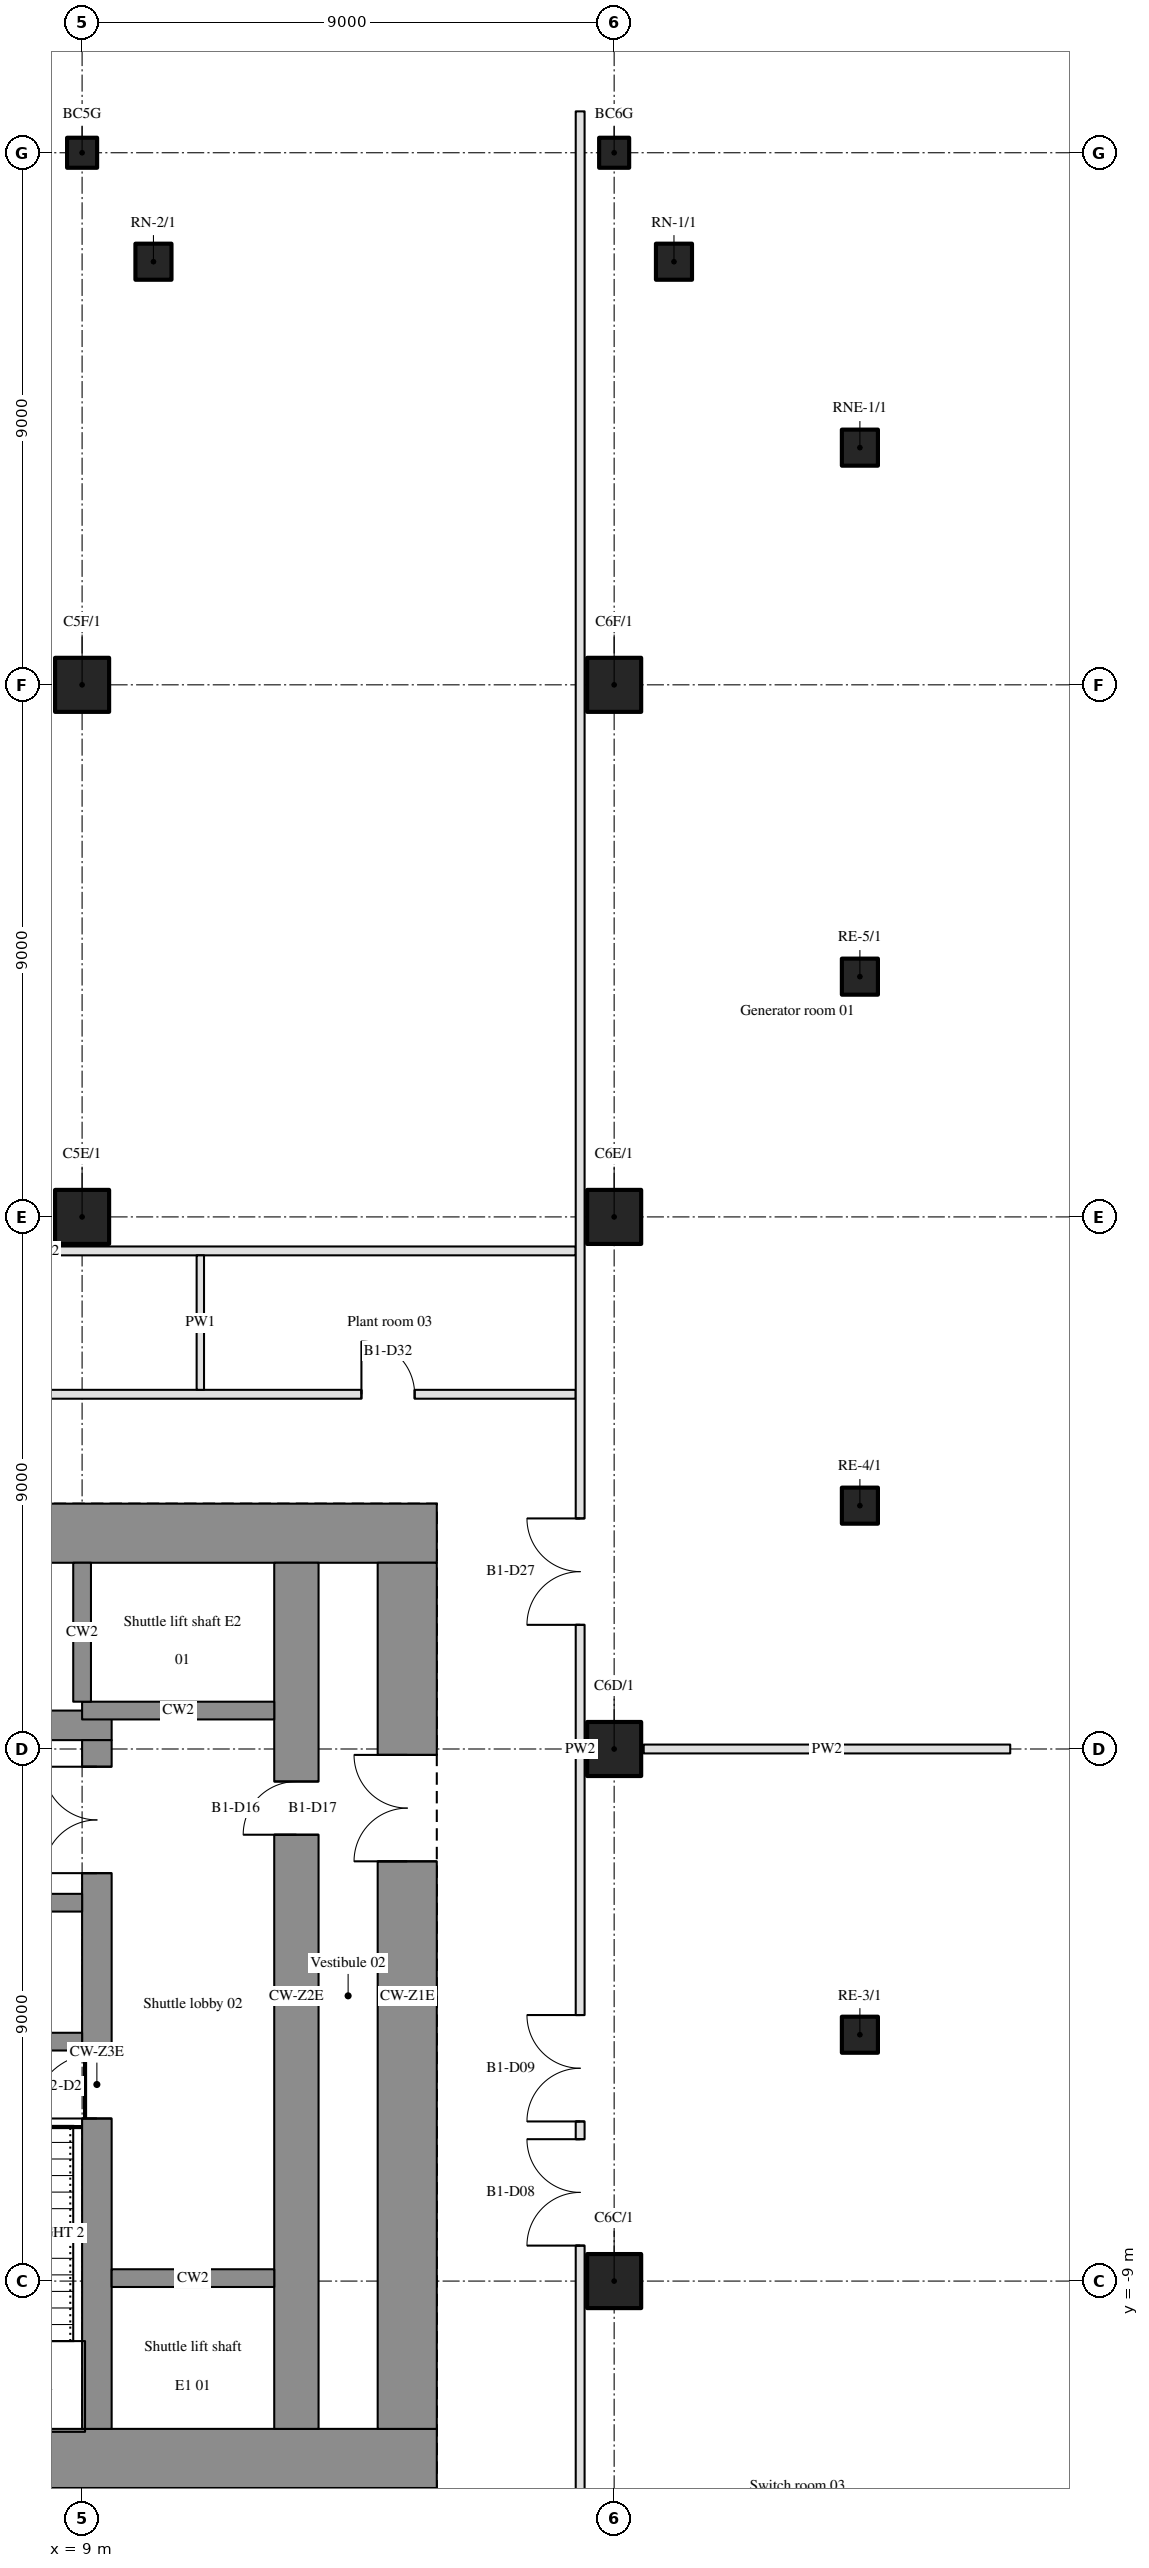
"""IFC4 building model, lengths in metres.
Left out: names, types, materials, properties, quantities, classifications, styles, units other than length and angle.
Written with IfcOpenShell. Run it as: python <this file> out.ifc"""

import sys

from ifc_helpers import new_model, si_unit, direction, frame, frame_2d, origin, origin_2d, place, context, subcontext, project, spatial, rectangle, hollow_circle, extrude, element, fill, save


model = new_model("IFC4")
c1 = context("Model", 3, precision=1e-05, world=origin(), true_north=direction((0.0, 1.0)))
c2 = subcontext(c1, "Body", "Model", "MODEL_VIEW")
j1 = project(units=[si_unit("LENGTHUNIT", "METRE"), si_unit("PLANEANGLEUNIT", "RADIAN")], contexts=[c1])
p1 = place(None, origin())
s1 = spatial("IfcSite", under=j1, at=p1, CompositionType="ELEMENT")
p2 = place(p1, origin())
s2 = spatial("IfcBuilding", under=s1, at=p2, CompositionType="ELEMENT")
p3 = place(p2, frame((0.0, 0.0, -5.0)))
s3 = spatial("IfcBuildingStorey", under=s2, at=p3, CompositionType="ELEMENT", Elevation=-5.0)
p4 = place(p3, frame((30.438, 27.129, -0.25), z_axis=(0.0, 0.0, 1.0), x_axis=(-0.707106781187, 0.707106781187, 0.0)))
e1 = element("IfcWall", 1, at=p4, inside=s3, PredefinedType="SOLIDWALL", context=c2, shape_type="SweptSolid", body=[
    extrude(rectangle(XDim=8.922, YDim=0.6, at=frame_2d((4.461, 0.0))), origin(), (0.0, 0.0, 1.0), 4.8),
])
for number, where, z_axis, x_axis in (
    (2, (9.0, 9.0, -0.25), (0.0, 0.0, 1.0), (1.0, 0.0, 0.0)),
    (3, (9.0, 18.0, -0.25), (0.0, 0.0, 1.0), (1.0, 0.0, 0.0)),
    (4, (18.0, -9.0, -0.25), (0.0, 0.0, 1.0), (1.0, 0.0, 0.0)),
    (5, (18.0, 0.0, -0.25), (0.0, 0.0, 1.0), (1.0, 0.0, 0.0)),
    (6, (18.0, 9.0, -0.25), (0.0, 0.0, 1.0), (1.0, 0.0, 0.0)),
    (7, (18.0, 18.0, -0.25), (0.0, 0.0, 1.0), (1.0, 0.0, 0.0)),
):
    element("IfcColumn", number, at=place(p3, frame(where, z_axis=z_axis, x_axis=x_axis)), inside=s3, PredefinedType="COLUMN", context=c2, shape_type="SweptSolid", body=[
        extrude(hollow_circle(Radius=0.457, WallThickness=0.05, at=origin_2d()), origin(), (0.0, 0.0, 1.0), 5.25),
    ])
for number, where, z_axis, x_axis in (
    (8, (22.157, -4.833, -0.25), (0.0, 0.0, 1.0), (1.0, 0.0, 0.0)),
    (9, (22.157, 4.116, -0.25), (0.0, 0.0, 1.0), (1.0, 0.0, 0.0)),
    (10, (22.157, 13.064, -0.25), (0.0, 0.0, 1.0), (1.0, 0.0, 0.0)),
    (11, (22.157, 22.012, -0.25), (0.0, 0.0, 1.0), (1.0, 0.0, 0.0)),
    (12, (19.012, 25.157, -0.25), (0.0, 0.0, 1.0), (1.0, 0.0, 0.0)),
    (13, (10.207, 25.157, -0.25), (0.0, 0.0, 1.0), (1.0, 0.0, 0.0)),
):
    element("IfcColumn", number, at=place(p3, frame(where, z_axis=z_axis, x_axis=x_axis)), inside=s3, PredefinedType="COLUMN", context=c2, shape_type="SweptSolid", body=[
        extrude(hollow_circle(Radius=0.305, WallThickness=0.03, at=origin_2d()), origin(), (0.0, 0.0, 1.0), 5.25),
    ])
for number, where, z_axis, x_axis in (
    (14, (9.0, 27.0, -0.25), (0.0, 0.0, 1.0), (1.0, 0.0, 0.0)),
    (15, (18.0, 27.0, -0.25), (0.0, 0.0, 1.0), (1.0, 0.0, 0.0)),
):
    element("IfcColumn", number, at=place(p3, frame(where, z_axis=z_axis, x_axis=x_axis)), inside=s3, PredefinedType="COLUMN", context=c2, shape_type="SweptSolid", body=[
        extrude(hollow_circle(Radius=0.254, WallThickness=0.03, at=origin_2d()), origin(), (0.0, 0.0, 1.0), 4.8),
    ])
for number, where, z_axis, x_axis in (
    (16, (-15.0, -12.0, -0.25), (0.0, 0.0, 1.0), (1.0, 0.0, 0.0)),
    (17, (-15.0, 3.65, -0.25), (0.0, 0.0, 1.0), (1.0, 0.0, 0.0)),
):
    element("IfcWall", number, at=place(p3, frame(where, z_axis=z_axis, x_axis=x_axis)), inside=s3, PredefinedType="SHEAR", context=c2, shape_type="SweptSolid", body=[
        extrude(rectangle(XDim=30.0, YDim=1.0, at=frame_2d((15.0, 0.0))), origin(), (0.0, 0.0, 1.0), 5.25),
    ])
p5 = place(p3, frame((14.5, -11.5, -0.25), z_axis=(0.0, 0.0, 1.0), x_axis=(0.0, 1.0, 0.0)))
e18 = element("IfcWall", 18, at=p5, inside=s3, PredefinedType="SHEAR", context=c2, shape_type="SweptSolid", body=[
    extrude(rectangle(XDim=14.65, YDim=1.0, at=frame_2d((7.325, 0.0))), origin(), (0.0, 0.0, 1.0), 5.25),
])
p6 = place(p5, frame((9.6, 0.0, 0.0)))
e19 = element("IfcOpeningElement", 19, at=p6, cuts=e18, PredefinedType="OPENING", context=c2, shape_type="SweptSolid", body=[
    extrude(rectangle(XDim=1.8, YDim=2.1, at=frame_2d((0.9, 1.05))), frame((0.0, 0.51, 0.0), z_axis=(0.0, -1.0, 0.0), x_axis=(1.0, 0.0, 0.0)), (0.0, 0.0, 1.0), 1.02),
])
p7 = place(p3, frame((12.625, -11.5, -0.25), z_axis=(0.0, 0.0, 1.0), x_axis=(0.0, 1.0, 0.0)))
e20 = element("IfcWall", 20, at=p7, inside=s3, PredefinedType="SHEAR", context=c2, shape_type="SweptSolid", body=[
    extrude(rectangle(XDim=14.65, YDim=0.75, at=frame_2d((7.325, 0.0))), origin(), (0.0, 0.0, 1.0), 5.25),
])
p8 = place(p7, frame((10.05, 0.0, 0.0)))
e21 = element("IfcOpeningElement", 21, at=p8, cuts=e20, PredefinedType="OPENING", context=c2, shape_type="SweptSolid", body=[
    extrude(rectangle(XDim=0.9, YDim=2.1, at=frame_2d((0.45, 1.05))), frame((0.0, 0.385, 0.0), z_axis=(0.0, -1.0, 0.0), x_axis=(1.0, 0.0, 0.0)), (0.0, 0.0, 1.0), 0.77),
])
p9 = place(p3, frame((-9.5, 0.4, -0.25), z_axis=(0.0, 0.0, 1.0), x_axis=(1.0, 0.0, 0.0)))
e22 = element("IfcWall", 22, at=p9, inside=s3, PredefinedType="SHEAR", context=c2, shape_type="SweptSolid", body=[
    extrude(rectangle(XDim=19.0, YDim=0.5, at=frame_2d((9.5, 0.0))), origin(), (0.0, 0.0, 1.0), 5.25),
])
p10 = place(p9, frame((1.4, 0.0, 0.0)))
e23 = element("IfcOpeningElement", 23, at=p10, cuts=e22, PredefinedType="OPENING", context=c2, shape_type="SweptSolid", body=[
    extrude(rectangle(XDim=0.9, YDim=2.1, at=frame_2d((0.45, 1.05))), frame((0.0, 0.26, 0.0), z_axis=(0.0, -1.0, 0.0), x_axis=(1.0, 0.0, 0.0)), (0.0, 0.0, 1.0), 0.52),
])
p11 = place(p9, frame((4.1, 0.0, 0.0)))
e24 = element("IfcOpeningElement", 24, at=p11, cuts=e22, PredefinedType="OPENING", context=c2, shape_type="SweptSolid", body=[
    extrude(rectangle(XDim=0.9, YDim=2.1, at=frame_2d((0.45, 1.05))), frame((0.0, 0.26, 0.0), z_axis=(0.0, -1.0, 0.0), x_axis=(1.0, 0.0, 0.0)), (0.0, 0.0, 1.0), 0.52),
])
p12 = place(p9, frame((6.8, 0.0, 0.0)))
e25 = element("IfcOpeningElement", 25, at=p12, cuts=e22, PredefinedType="OPENING", context=c2, shape_type="SweptSolid", body=[
    extrude(rectangle(XDim=0.9, YDim=2.1, at=frame_2d((0.45, 1.05))), frame((0.0, 0.26, 0.0), z_axis=(0.0, -1.0, 0.0), x_axis=(1.0, 0.0, 0.0)), (0.0, 0.0, 1.0), 0.52),
])
p13 = place(p9, frame((11.3, 0.0, 0.0)))
e26 = element("IfcOpeningElement", 26, at=p13, cuts=e22, PredefinedType="OPENING", context=c2, shape_type="SweptSolid", body=[
    extrude(rectangle(XDim=0.9, YDim=2.1, at=frame_2d((0.45, 1.05))), frame((0.0, 0.26, 0.0), z_axis=(0.0, -1.0, 0.0), x_axis=(1.0, 0.0, 0.0)), (0.0, 0.0, 1.0), 0.52),
])
p14 = place(p9, frame((14.0, 0.0, 0.0)))
e27 = element("IfcOpeningElement", 27, at=p14, cuts=e22, PredefinedType="OPENING", context=c2, shape_type="SweptSolid", body=[
    extrude(rectangle(XDim=0.9, YDim=2.1, at=frame_2d((0.45, 1.05))), frame((0.0, 0.26, 0.0), z_axis=(0.0, -1.0, 0.0), x_axis=(1.0, 0.0, 0.0)), (0.0, 0.0, 1.0), 0.52),
])
p15 = place(p9, frame((16.7, 0.0, 0.0)))
e28 = element("IfcOpeningElement", 28, at=p15, cuts=e22, PredefinedType="OPENING", context=c2, shape_type="SweptSolid", body=[
    extrude(rectangle(XDim=0.9, YDim=2.1, at=frame_2d((0.45, 1.05))), frame((0.0, 0.26, 0.0), z_axis=(0.0, -1.0, 0.0), x_axis=(1.0, 0.0, 0.0)), (0.0, 0.0, 1.0), 0.52),
])
p16 = place(p9, frame((9.05, 0.0, 0.0)))
e29 = element("IfcOpeningElement", 29, at=p16, cuts=e22, PredefinedType="OPENING", context=c2, shape_type="SweptSolid", body=[
    extrude(rectangle(XDim=0.9, YDim=2.1, at=frame_2d((0.45, 1.05))), frame((0.0, 0.26, 0.0), z_axis=(0.0, -1.0, 0.0), x_axis=(1.0, 0.0, 0.0)), (0.0, 0.0, 1.0), 0.52),
])
p17 = place(p3, frame((9.25, -11.5, -0.25), z_axis=(0.0, 0.0, 1.0), x_axis=(0.0, 1.0, 0.0)))
e30 = element("IfcWall", 30, at=p17, inside=s3, PredefinedType="SHEAR", context=c2, shape_type="SweptSolid", body=[
    extrude(rectangle(XDim=11.65, YDim=0.5, at=frame_2d((5.825, 0.0))), origin(), (0.0, 0.0, 1.0), 5.25),
])
p18 = place(p17, frame((9.4, 0.0, 0.0)))
e31 = element("IfcOpeningElement", 31, at=p18, cuts=e30, PredefinedType="OPENING", context=c2, shape_type="SweptSolid", body=[
    extrude(rectangle(XDim=1.8, YDim=2.1, at=frame_2d((0.9, 1.05))), frame((0.0, 0.26, 0.0), z_axis=(0.0, -1.0, 0.0), x_axis=(1.0, 0.0, 0.0)), (0.0, 0.0, 1.0), 0.52),
])
p19 = place(p17, frame((5.25, 0.0, 0.0)))
e32 = element("IfcOpeningElement", 32, at=p19, cuts=e30, PredefinedType="OPENING", context=c2, shape_type="SweptSolid", body=[
    extrude(rectangle(XDim=1.1, YDim=2.1, at=frame_2d((0.55, 1.05))), frame((0.0, 0.26, 0.0), z_axis=(0.0, -1.0, 0.0), x_axis=(1.0, 0.0, 0.0)), (0.0, 0.0, 1.0), 0.52),
])
p20 = place(p3, frame((9.5, -8.95, 0.0), z_axis=(0.0, 0.0, 1.0), x_axis=(1.0, 0.0, 0.0)))
e33 = element("IfcWall", 33, at=p20, inside=s3, PredefinedType="SHEAR", context=c2, shape_type="SweptSolid", body=[
    extrude(rectangle(XDim=2.75, YDim=0.3, at=frame_2d((1.375, 0.0))), origin(), (0.0, 0.0, 1.0), 5.0),
])
for number, where, z_axis, x_axis in (
    (34, (0.9, -4.95, 0.0), (0.0, 0.0, 1.0), (1.0, 0.0, 0.0)),
    (35, (0.9, -2.6, 0.0), (0.0, 0.0, 1.0), (1.0, 0.0, 0.0)),
):
    element("IfcWall", number, at=place(p3, frame(where, z_axis=z_axis, x_axis=x_axis)), inside=s3, PredefinedType="SHEAR", context=c2, shape_type="SweptSolid", body=[
        extrude(rectangle(XDim=8.1, YDim=0.3, at=frame_2d((4.05, 0.0))), origin(), (0.0, 0.0, 1.0), 5.0),
    ])
p21 = place(p3, frame((18.5, 0.0, 0.0), z_axis=(0.0, 0.0, 1.0), x_axis=(1.0, 0.0, 0.0)))
e36 = element("IfcWall", 36, at=p21, inside=s3, PredefinedType="PARTITIONING", context=c2, shape_type="SweptSolid", body=[
    extrude(rectangle(XDim=6.2, YDim=0.15, at=frame_2d((3.1, 0.0))), origin(), (0.0, 0.0, 1.0), 4.06),
])
p22 = place(p3, frame((12.25, 0.65, 0.0), z_axis=(0.0, 0.0, 1.0), x_axis=(-1.0, 0.0, 0.0)))
e37 = element("IfcWall", 37, at=p22, inside=s3, PredefinedType="SHEAR", context=c2, shape_type="SweptSolid", body=[
    extrude(rectangle(XDim=3.25, YDim=0.3, at=frame_2d((1.625, 0.0))), origin(), (0.0, 0.0, 1.0), 5.0),
])
p23 = place(p3, frame((-0.55, 6.0, 0.0), z_axis=(0.0, 0.0, 1.0), x_axis=(1.0, 0.0, 0.0)))
e38 = element("IfcWall", 38, at=p23, inside=s3, PredefinedType="PARTITIONING", context=c2, shape_type="SweptSolid", body=[
    extrude(rectangle(XDim=17.9, YDim=0.15, at=frame_2d((8.95, 0.0))), origin(), (0.0, 0.0, 1.0), 4.06),
])
p24 = place(p23, frame((1.325, 0.0, 0.0)))
e39 = element("IfcOpeningElement", 39, at=p24, cuts=e38, PredefinedType="OPENING", context=c2, shape_type="SweptSolid", body=[
    extrude(rectangle(XDim=0.9, YDim=2.1, at=frame_2d((0.45, 1.05))), frame((0.0, 0.085, 0.0), z_axis=(0.0, -1.0, 0.0), x_axis=(1.0, 0.0, 0.0)), (0.0, 0.0, 1.0), 0.17),
])
p25 = place(p23, frame((7.1, 0.0, 0.0)))
e40 = element("IfcOpeningElement", 40, at=p25, cuts=e38, PredefinedType="OPENING", context=c2, shape_type="SweptSolid", body=[
    extrude(rectangle(XDim=0.9, YDim=2.1, at=frame_2d((0.45, 1.05))), frame((0.0, 0.085, 0.0), z_axis=(0.0, -1.0, 0.0), x_axis=(1.0, 0.0, 0.0)), (0.0, 0.0, 1.0), 0.17),
])
p26 = place(p23, frame((14.275, 0.0, 0.0)))
e41 = element("IfcOpeningElement", 41, at=p26, cuts=e38, PredefinedType="OPENING", context=c2, shape_type="SweptSolid", body=[
    extrude(rectangle(XDim=0.9, YDim=2.1, at=frame_2d((0.45, 1.05))), frame((0.0, 0.085, 0.0), z_axis=(0.0, -1.0, 0.0), x_axis=(1.0, 0.0, 0.0)), (0.0, 0.0, 1.0), 0.17),
])
p27 = place(p3, frame((-0.65, 8.425, 0.0), z_axis=(0.0, 0.0, 1.0), x_axis=(1.0, 0.0, 0.0)))
e42 = element("IfcWall", 42, at=p27, inside=s3, PredefinedType="PARTITIONING", context=c2, shape_type="SweptSolid", body=[
    extrude(rectangle(XDim=18.0, YDim=0.15, at=frame_2d((9.0, 0.0))), origin(), (0.0, 0.0, 1.0), 4.06),
])
p28 = place(p3, frame((9.0, 0.8, 0.0), z_axis=(0.0, 0.0, 1.0), x_axis=(0.0, 1.0, 0.0)))
e43 = element("IfcWall", 43, at=p28, inside=s3, PredefinedType="SHEAR", context=c2, shape_type="SweptSolid", body=[
    extrude(rectangle(XDim=2.35, YDim=0.3, at=frame_2d((1.175, 0.0))), origin(), (0.0, 0.0, 1.0), 5.0),
])
p29 = place(p3, frame((11.0, 6.075, 0.0), z_axis=(0.0, 0.0, 1.0), x_axis=(0.0, 1.0, 0.0)))
e44 = element("IfcWall", 44, at=p29, inside=s3, PredefinedType="PARTITIONING", context=c2, shape_type="SweptSolid", body=[
    extrude(rectangle(XDim=2.275, YDim=0.125, at=frame_2d((1.138, 0.0))), origin(), (0.0, 0.0, 1.0), 4.06),
])
p30 = place(p3, frame((17.425, -27.7, 0.0), z_axis=(0.0, 0.0, 1.0), x_axis=(0.0, 1.0, 0.0)))
e45 = element("IfcWall", 45, at=p30, inside=s3, PredefinedType="PARTITIONING", context=c2, shape_type="SweptSolid", body=[
    extrude(rectangle(XDim=55.4, YDim=0.15, at=frame_2d((27.7, 0.0))), origin(), (0.0, 0.0, 1.0), 4.06),
])
p31 = place(p30, frame((19.3, 0.0, 0.0)))
e46 = element("IfcOpeningElement", 46, at=p31, cuts=e45, PredefinedType="OPENING", context=c2, shape_type="SweptSolid", body=[
    extrude(rectangle(XDim=1.8, YDim=2.1, at=frame_2d((0.9, 1.05))), frame((0.0, 0.085, 0.0), z_axis=(0.0, -1.0, 0.0), x_axis=(1.0, 0.0, 0.0)), (0.0, 0.0, 1.0), 0.17),
])
p32 = place(p30, frame((21.4, 0.0, 0.0)))
e47 = element("IfcOpeningElement", 47, at=p32, cuts=e45, PredefinedType="OPENING", context=c2, shape_type="SweptSolid", body=[
    extrude(rectangle(XDim=1.8, YDim=2.1, at=frame_2d((0.9, 1.05))), frame((0.0, 0.085, 0.0), z_axis=(0.0, -1.0, 0.0), x_axis=(1.0, 0.0, 0.0)), (0.0, 0.0, 1.0), 0.17),
])
p33 = place(p30, frame((29.8, 0.0, 0.0)))
e48 = element("IfcOpeningElement", 48, at=p33, cuts=e45, PredefinedType="OPENING", context=c2, shape_type="SweptSolid", body=[
    extrude(rectangle(XDim=1.8, YDim=2.1, at=frame_2d((0.9, 1.05))), frame((0.0, 0.085, 0.0), z_axis=(0.0, -1.0, 0.0), x_axis=(1.0, 0.0, 0.0)), (0.0, 0.0, 1.0), 0.17),
])
p34 = place(p31, origin())
e49 = element("IfcDoor", 49, at=p34, inside=s3, OperationType="DOUBLE_DOOR_SINGLE_SWING", PredefinedType="DOOR", context=c2, shape_type="SweptSolid", body=[
    extrude(rectangle(XDim=1.8, YDim=2.1, at=frame_2d((0.9, 1.05))), frame((0.0, 0.025, 0.0), z_axis=(0.0, -1.0, 0.0), x_axis=(1.0, 0.0, 0.0)), (0.0, 0.0, 1.0), 0.05),
])
fill(e46, e49)
p35 = place(p32, origin())
e50 = element("IfcDoor", 50, at=p35, inside=s3, OperationType="DOUBLE_DOOR_SINGLE_SWING", PredefinedType="DOOR", context=c2, shape_type="SweptSolid", body=[
    extrude(rectangle(XDim=1.8, YDim=2.1, at=frame_2d((0.9, 1.05))), frame((0.0, 0.025, 0.0), z_axis=(0.0, -1.0, 0.0), x_axis=(1.0, 0.0, 0.0)), (0.0, 0.0, 1.0), 0.05),
])
fill(e47, e50)
p36 = place(p33, origin())
e51 = element("IfcDoor", 51, at=p36, inside=s3, OperationType="DOUBLE_DOOR_SINGLE_SWING", PredefinedType="DOOR", context=c2, shape_type="SweptSolid", body=[
    extrude(rectangle(XDim=1.8, YDim=2.1, at=frame_2d((0.9, 1.05))), frame((0.0, 0.025, 0.0), z_axis=(0.0, -1.0, 0.0), x_axis=(1.0, 0.0, 0.0)), (0.0, 0.0, 1.0), 0.05),
])
fill(e48, e51)
p37 = place(p6, origin())
e52 = element("IfcDoor", 52, at=p37, inside=s3, OperationType="DOUBLE_DOOR_SINGLE_SWING", PredefinedType="DOOR", context=c2, shape_type="SweptSolid", body=[
    extrude(rectangle(XDim=1.8, YDim=2.1, at=frame_2d((0.9, 1.05))), frame((0.0, 0.025, 0.0), z_axis=(0.0, -1.0, 0.0), x_axis=(1.0, 0.0, 0.0)), (0.0, 0.0, 1.0), 0.05),
])
fill(e19, e52)
p38 = place(p18, origin())
e53 = element("IfcDoor", 53, at=p38, inside=s3, OperationType="DOUBLE_DOOR_SINGLE_SWING", PredefinedType="DOOR", context=c2, shape_type="SweptSolid", body=[
    extrude(rectangle(XDim=1.8, YDim=2.1, at=frame_2d((0.9, 1.05))), frame((0.0, 0.025, 0.0), z_axis=(0.0, -1.0, 0.0), x_axis=(1.0, 0.0, 0.0)), (0.0, 0.0, 1.0), 0.05),
])
fill(e31, e53)
p39 = place(p19, origin())
e54 = element("IfcDoor", 54, at=p39, inside=s3, OperationType="SINGLE_SWING_LEFT", PredefinedType="DOOR", context=c2, shape_type="SweptSolid", body=[
    extrude(rectangle(XDim=1.1, YDim=2.1, at=frame_2d((0.55, 1.05))), frame((0.0, 0.025, 0.0), z_axis=(0.0, -1.0, 0.0), x_axis=(1.0, 0.0, 0.0)), (0.0, 0.0, 1.0), 0.05),
])
fill(e32, e54)
p40 = place(p26, origin())
e55 = element("IfcDoor", 55, at=p40, inside=s3, OperationType="SINGLE_SWING_LEFT", PredefinedType="DOOR", context=c2, shape_type="SweptSolid", body=[
    extrude(rectangle(XDim=0.9, YDim=2.1, at=frame_2d((0.45, 1.05))), frame((0.0, 0.025, 0.0), z_axis=(0.0, -1.0, 0.0), x_axis=(1.0, 0.0, 0.0)), (0.0, 0.0, 1.0), 0.05),
])
fill(e41, e55)
p41 = place(p8, origin())
e56 = element("IfcDoor", 56, at=p41, inside=s3, OperationType="SINGLE_SWING_LEFT", PredefinedType="DOOR", context=c2, shape_type="SweptSolid", body=[
    extrude(rectangle(XDim=0.9, YDim=2.1, at=frame_2d((0.45, 1.05))), frame((0.0, 0.025, 0.0), z_axis=(0.0, -1.0, 0.0), x_axis=(1.0, 0.0, 0.0)), (0.0, 0.0, 1.0), 0.05),
])
fill(e21, e56)
save(model, sys.argv[1])
